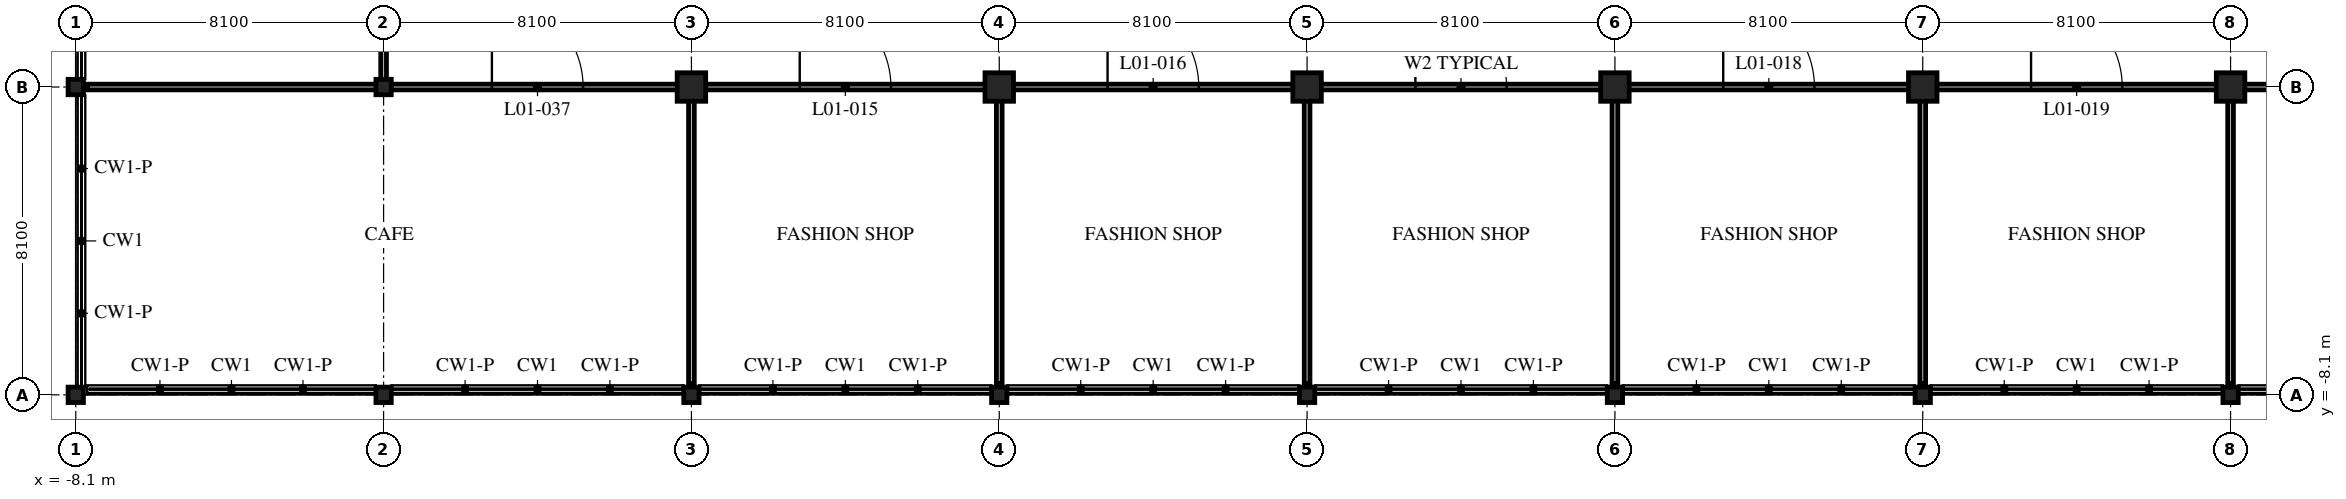
"""IFC4 building model, lengths in metres.
Left out: names, types, materials, properties, quantities, classifications, styles, units other than length and angle.
Written with IfcOpenShell. Run it as: python <this file> out.ifc"""

import sys

from ifc_helpers import new_model, si_unit, direction, frame, frame_2d, origin, origin_with_axes, origin_2d, place, context, subcontext, project, spatial, rectangle, hollow_rectangle, i_section, extrude, element, fill, save


model = new_model("IFC4")
c1 = context("Model", 3, precision=1e-05, world=origin(), true_north=direction((0.0, 1.0)))
c2 = subcontext(c1, "Body", "Model", "MODEL_VIEW")
j1 = project(units=[si_unit("LENGTHUNIT", "METRE"), si_unit("PLANEANGLEUNIT", "RADIAN")], contexts=[c1])
p1 = place(None, origin())
s1 = spatial("IfcSite", under=j1, at=p1, CompositionType="ELEMENT")
p2 = place(p1, origin())
s2 = spatial("IfcBuilding", under=s1, at=p2, CompositionType="ELEMENT")
p3 = place(p2, frame((0.0, 0.0, 6.0)))
s3 = spatial("IfcBuildingStorey", under=s2, at=p3, CompositionType="ELEMENT", Elevation=6.0)
for number, where, z_axis, x_axis in (
    (1, (-8.1, -8.1, 0.0), (0.0, 0.0, 1.0), (1.0, 0.0, 0.0)),
    (2, (-8.1, 0.0, 0.0), (0.0, 0.0, 1.0), (1.0, 0.0, 0.0)),
    (3, (0.0, -8.1, 0.0), (0.0, 0.0, 1.0), (1.0, 0.0, 0.0)),
    (4, (0.0, 0.0, 0.0), (0.0, 0.0, 1.0), (1.0, 0.0, 0.0)),
    (5, (8.1, -8.1, 0.0), (0.0, 0.0, 1.0), (1.0, 0.0, 0.0)),
):
    element("IfcColumn", number, at=place(p3, frame(where, z_axis=z_axis, x_axis=x_axis)), inside=s3, PredefinedType="COLUMN", context=c2, shape_type="SweptSolid", body=[
        extrude(i_section(OverallWidth=0.403, OverallDepth=0.406, WebThickness=0.027, FlangeThickness=0.043, FilletRadius=0.015, at=origin_2d()), origin(), (0.0, 0.0, 1.0), 5.4),
    ])
p4 = place(p3, frame((8.1, 0.0, 0.0), z_axis=(0.0, 0.0, 1.0), x_axis=(1.0, 0.0, 0.0)))
e6 = element("IfcColumn", 6, at=p4, inside=s3, PredefinedType="COLUMN", context=c2, shape_type="SweptSolid", body=[
    extrude(hollow_rectangle(XDim=0.75, YDim=0.75, WallThickness=0.07, at=origin_2d()), origin(), (0.0, 0.0, 1.0), 5.4),
])
p5 = place(p3, frame((16.2, -8.1, 0.0), z_axis=(0.0, 0.0, 1.0), x_axis=(1.0, 0.0, 0.0)))
e7 = element("IfcColumn", 7, at=p5, inside=s3, PredefinedType="COLUMN", context=c2, shape_type="SweptSolid", body=[
    extrude(i_section(OverallWidth=0.403, OverallDepth=0.406, WebThickness=0.027, FlangeThickness=0.043, FilletRadius=0.015, at=origin_2d()), origin(), (0.0, 0.0, 1.0), 5.4),
])
p6 = place(p3, frame((16.2, 0.0, 0.0), z_axis=(0.0, 0.0, 1.0), x_axis=(1.0, 0.0, 0.0)))
e8 = element("IfcColumn", 8, at=p6, inside=s3, PredefinedType="COLUMN", context=c2, shape_type="SweptSolid", body=[
    extrude(hollow_rectangle(XDim=0.75, YDim=0.75, WallThickness=0.07, at=origin_2d()), origin(), (0.0, 0.0, 1.0), 5.4),
])
p7 = place(p3, frame((24.3, -8.1, 0.0), z_axis=(0.0, 0.0, 1.0), x_axis=(1.0, 0.0, 0.0)))
e9 = element("IfcColumn", 9, at=p7, inside=s3, PredefinedType="COLUMN", context=c2, shape_type="SweptSolid", body=[
    extrude(i_section(OverallWidth=0.403, OverallDepth=0.406, WebThickness=0.027, FlangeThickness=0.043, FilletRadius=0.015, at=origin_2d()), origin(), (0.0, 0.0, 1.0), 5.4),
])
p8 = place(p3, frame((24.3, 0.0, 0.0), z_axis=(0.0, 0.0, 1.0), x_axis=(1.0, 0.0, 0.0)))
e10 = element("IfcColumn", 10, at=p8, inside=s3, PredefinedType="COLUMN", context=c2, shape_type="SweptSolid", body=[
    extrude(hollow_rectangle(XDim=0.75, YDim=0.75, WallThickness=0.07, at=origin_2d()), origin(), (0.0, 0.0, 1.0), 5.4),
])
p9 = place(p3, frame((32.4, -8.1, 0.0), z_axis=(0.0, 0.0, 1.0), x_axis=(1.0, 0.0, 0.0)))
e11 = element("IfcColumn", 11, at=p9, inside=s3, PredefinedType="COLUMN", context=c2, shape_type="SweptSolid", body=[
    extrude(i_section(OverallWidth=0.403, OverallDepth=0.406, WebThickness=0.027, FlangeThickness=0.043, FilletRadius=0.015, at=origin_2d()), origin(), (0.0, 0.0, 1.0), 5.4),
])
p10 = place(p3, frame((32.4, 0.0, 0.0), z_axis=(0.0, 0.0, 1.0), x_axis=(1.0, 0.0, 0.0)))
e12 = element("IfcColumn", 12, at=p10, inside=s3, PredefinedType="COLUMN", context=c2, shape_type="SweptSolid", body=[
    extrude(hollow_rectangle(XDim=0.75, YDim=0.75, WallThickness=0.07, at=origin_2d()), origin(), (0.0, 0.0, 1.0), 5.4),
])
p11 = place(p3, frame((40.5, -8.1, 0.0), z_axis=(0.0, 0.0, 1.0), x_axis=(1.0, 0.0, 0.0)))
e13 = element("IfcColumn", 13, at=p11, inside=s3, PredefinedType="COLUMN", context=c2, shape_type="SweptSolid", body=[
    extrude(i_section(OverallWidth=0.403, OverallDepth=0.406, WebThickness=0.027, FlangeThickness=0.043, FilletRadius=0.015, at=origin_2d()), origin(), (0.0, 0.0, 1.0), 5.4),
])
p12 = place(p3, frame((40.5, 0.0, 0.0), z_axis=(0.0, 0.0, 1.0), x_axis=(1.0, 0.0, 0.0)))
e14 = element("IfcColumn", 14, at=p12, inside=s3, PredefinedType="COLUMN", context=c2, shape_type="SweptSolid", body=[
    extrude(hollow_rectangle(XDim=0.75, YDim=0.75, WallThickness=0.07, at=origin_2d()), origin(), (0.0, 0.0, 1.0), 5.4),
])
p13 = place(p3, frame((48.6, -8.1, 0.0), z_axis=(0.0, 0.0, 1.0), x_axis=(1.0, 0.0, 0.0)))
e15 = element("IfcColumn", 15, at=p13, inside=s3, PredefinedType="COLUMN", context=c2, shape_type="SweptSolid", body=[
    extrude(i_section(OverallWidth=0.403, OverallDepth=0.406, WebThickness=0.027, FlangeThickness=0.043, FilletRadius=0.015, at=origin_2d()), origin(), (0.0, 0.0, 1.0), 5.4),
])
p14 = place(p3, frame((48.6, 0.0, 0.0), z_axis=(0.0, 0.0, 1.0), x_axis=(1.0, 0.0, 0.0)))
e16 = element("IfcColumn", 16, at=p14, inside=s3, PredefinedType="COLUMN", context=c2, shape_type="SweptSolid", body=[
    extrude(hollow_rectangle(XDim=0.75, YDim=0.75, WallThickness=0.07, at=origin_2d()), origin(), (0.0, 0.0, 1.0), 5.4),
])
p15 = place(p3, origin_with_axes())
e17 = element("IfcWall", 17, at=p15, inside=s3, PredefinedType="PARTITIONING", context=c2, shape_type="SweptSolid", body=[
    extrude(rectangle(XDim=56.7, YDim=0.15, at=frame_2d((28.35, 0.0))), origin(), (0.0, 0.0, 1.0), 4.538),
])
p16 = place(p15, frame((10.95, 0.0, 0.0)))
e18 = element("IfcOpeningElement", 18, at=p16, cuts=e17, PredefinedType="OPENING", context=c2, shape_type="SweptSolid", body=[
    extrude(rectangle(XDim=2.4, YDim=2.7, at=frame_2d((1.2, 1.35))), frame((0.0, 0.085, 0.0), z_axis=(0.0, -1.0, 0.0), x_axis=(1.0, 0.0, 0.0)), (0.0, 0.0, 1.0), 0.17),
])
p17 = place(p15, frame((19.05, 0.0, 0.0)))
e19 = element("IfcOpeningElement", 19, at=p17, cuts=e17, PredefinedType="OPENING", context=c2, shape_type="SweptSolid", body=[
    extrude(rectangle(XDim=2.4, YDim=2.7, at=frame_2d((1.2, 1.35))), frame((0.0, 0.085, 0.0), z_axis=(0.0, -1.0, 0.0), x_axis=(1.0, 0.0, 0.0)), (0.0, 0.0, 1.0), 0.17),
])
p18 = place(p15, frame((27.15, 0.0, 0.0)))
e20 = element("IfcOpeningElement", 20, at=p18, cuts=e17, PredefinedType="OPENING", context=c2, shape_type="SweptSolid", body=[
    extrude(rectangle(XDim=2.4, YDim=2.7, at=frame_2d((1.2, 1.35))), frame((0.0, 0.085, 0.0), z_axis=(0.0, -1.0, 0.0), x_axis=(1.0, 0.0, 0.0)), (0.0, 0.0, 1.0), 0.17),
])
p19 = place(p15, frame((35.25, 0.0, 0.0)))
e21 = element("IfcOpeningElement", 21, at=p19, cuts=e17, PredefinedType="OPENING", context=c2, shape_type="SweptSolid", body=[
    extrude(rectangle(XDim=2.4, YDim=2.7, at=frame_2d((1.2, 1.35))), frame((0.0, 0.085, 0.0), z_axis=(0.0, -1.0, 0.0), x_axis=(1.0, 0.0, 0.0)), (0.0, 0.0, 1.0), 0.17),
])
p20 = place(p15, frame((43.35, 0.0, 0.0)))
e22 = element("IfcOpeningElement", 22, at=p20, cuts=e17, PredefinedType="OPENING", context=c2, shape_type="SweptSolid", body=[
    extrude(rectangle(XDim=2.4, YDim=2.7, at=frame_2d((1.2, 1.35))), frame((0.0, 0.085, 0.0), z_axis=(0.0, -1.0, 0.0), x_axis=(1.0, 0.0, 0.0)), (0.0, 0.0, 1.0), 0.17),
])
p21 = place(p15, frame((2.85, 0.0, 0.0)))
e23 = element("IfcOpeningElement", 23, at=p21, cuts=e17, PredefinedType="OPENING", context=c2, shape_type="SweptSolid", body=[
    extrude(rectangle(XDim=2.4, YDim=2.7, at=frame_2d((1.2, 1.35))), frame((0.0, 0.085, 0.0), z_axis=(0.0, -1.0, 0.0), x_axis=(1.0, 0.0, 0.0)), (0.0, 0.0, 1.0), 0.17),
])
p22 = place(p15, frame((51.45, 0.0, 0.0)))
e24 = element("IfcOpeningElement", 24, at=p22, cuts=e17, PredefinedType="OPENING", context=c2, shape_type="SweptSolid", body=[
    extrude(rectangle(XDim=2.4, YDim=2.7, at=frame_2d((1.2, 1.35))), frame((0.0, 0.085, 0.0), z_axis=(0.0, -1.0, 0.0), x_axis=(1.0, 0.0, 0.0)), (0.0, 0.0, 1.0), 0.17),
])
p23 = place(p3, frame((0.0, 0.0, 0.0), z_axis=(0.0, 0.0, 1.0), x_axis=(0.0, 1.0, 0.0)))
e25 = element("IfcWall", 25, at=p23, inside=s3, PredefinedType="PARTITIONING", context=c2, shape_type="SweptSolid", body=[
    extrude(rectangle(XDim=44.1, YDim=0.15, at=frame_2d((22.05, 0.0))), origin(), (0.0, 0.0, 1.0), 4.538),
])
p24 = place(p23, frame((2.85, 0.0, 0.0)))
e26 = element("IfcOpeningElement", 26, at=p24, cuts=e25, PredefinedType="OPENING", context=c2, shape_type="SweptSolid", body=[
    extrude(rectangle(XDim=2.4, YDim=2.7, at=frame_2d((1.2, 1.35))), frame((0.0, 0.085, 0.0), z_axis=(0.0, -1.0, 0.0), x_axis=(1.0, 0.0, 0.0)), (0.0, 0.0, 1.0), 0.17),
])
p25 = place(p23, frame((10.95, 0.0, 0.0)))
e27 = element("IfcOpeningElement", 27, at=p25, cuts=e25, PredefinedType="OPENING", context=c2, shape_type="SweptSolid", body=[
    extrude(rectangle(XDim=2.4, YDim=2.7, at=frame_2d((1.2, 1.35))), frame((0.0, 0.085, 0.0), z_axis=(0.0, -1.0, 0.0), x_axis=(1.0, 0.0, 0.0)), (0.0, 0.0, 1.0), 0.17),
])
p26 = place(p23, frame((19.05, 0.0, 0.0)))
e28 = element("IfcOpeningElement", 28, at=p26, cuts=e25, PredefinedType="OPENING", context=c2, shape_type="SweptSolid", body=[
    extrude(rectangle(XDim=2.4, YDim=2.7, at=frame_2d((1.2, 1.35))), frame((0.0, 0.085, 0.0), z_axis=(0.0, -1.0, 0.0), x_axis=(1.0, 0.0, 0.0)), (0.0, 0.0, 1.0), 0.17),
])
p27 = place(p23, frame((27.15, 0.0, 0.0)))
e29 = element("IfcOpeningElement", 29, at=p27, cuts=e25, PredefinedType="OPENING", context=c2, shape_type="SweptSolid", body=[
    extrude(rectangle(XDim=2.4, YDim=2.7, at=frame_2d((1.2, 1.35))), frame((0.0, 0.085, 0.0), z_axis=(0.0, -1.0, 0.0), x_axis=(1.0, 0.0, 0.0)), (0.0, 0.0, 1.0), 0.17),
])
p28 = place(p23, frame((35.25, 0.0, 0.0)))
e30 = element("IfcOpeningElement", 30, at=p28, cuts=e25, PredefinedType="OPENING", context=c2, shape_type="SweptSolid", body=[
    extrude(rectangle(XDim=2.4, YDim=2.7, at=frame_2d((1.2, 1.35))), frame((0.0, 0.085, 0.0), z_axis=(0.0, -1.0, 0.0), x_axis=(1.0, 0.0, 0.0)), (0.0, 0.0, 1.0), 0.17),
])
p29 = place(p23, frame((41.325, 0.0, 0.0)))
e31 = element("IfcOpeningElement", 31, at=p29, cuts=e25, PredefinedType="OPENING", context=c2, shape_type="SweptSolid", body=[
    extrude(rectangle(XDim=2.4, YDim=2.7, at=frame_2d((1.2, 1.35))), frame((0.0, 0.085, 0.0), z_axis=(0.0, -1.0, 0.0), x_axis=(1.0, 0.0, 0.0)), (0.0, 0.0, 1.0), 0.17),
])
for number, where, z_axis, x_axis in (
    (32, (16.2, 0.0, 0.0), (0.0, 0.0, 1.0), (0.0, -1.0, 0.0)),
    (33, (24.3, 0.0, 0.0), (0.0, 0.0, 1.0), (0.0, -1.0, 0.0)),
    (34, (32.4, 0.0, 0.0), (0.0, 0.0, 1.0), (0.0, -1.0, 0.0)),
    (35, (40.5, 0.0, 0.0), (0.0, 0.0, 1.0), (0.0, -1.0, 0.0)),
    (36, (-7.8, 0.0, 0.0), (0.0, 0.0, 1.0), (1.0, 0.0, 0.0)),
    (37, (8.1, 0.0, 0.0), (0.0, 0.0, 1.0), (0.0, -1.0, 0.0)),
    (38, (48.6, 0.0, 0.0), (0.0, 0.0, 1.0), (0.0, -1.0, 0.0)),
):
    element("IfcWall", number, at=place(p3, frame(where, z_axis=z_axis, x_axis=x_axis)), inside=s3, PredefinedType="PARTITIONING", context=c2, shape_type="SweptSolid", body=[
        extrude(rectangle(XDim=7.8, YDim=0.15, at=frame_2d((3.9, 0.0))), origin(), (0.0, 0.0, 1.0), 4.538),
    ])
p30 = place(p16, origin())
e39 = element("IfcDoor", 39, at=p30, inside=s3, OperationType="DOUBLE_DOOR_SINGLE_SWING", PredefinedType="DOOR", context=c2, shape_type="SweptSolid", body=[
    extrude(rectangle(XDim=2.4, YDim=2.7, at=frame_2d((1.2, 1.35))), frame((0.0, 0.025, 0.0), z_axis=(0.0, -1.0, 0.0), x_axis=(1.0, 0.0, 0.0)), (0.0, 0.0, 1.0), 0.05),
])
fill(e18, e39)
p31 = place(p17, origin())
e40 = element("IfcDoor", 40, at=p31, inside=s3, OperationType="DOUBLE_DOOR_SINGLE_SWING", PredefinedType="DOOR", context=c2, shape_type="SweptSolid", body=[
    extrude(rectangle(XDim=2.4, YDim=2.7, at=frame_2d((1.2, 1.35))), frame((0.0, 0.025, 0.0), z_axis=(0.0, -1.0, 0.0), x_axis=(1.0, 0.0, 0.0)), (0.0, 0.0, 1.0), 0.05),
])
fill(e19, e40)
p32 = place(p18, origin())
e41 = element("IfcDoor", 41, at=p32, inside=s3, OperationType="DOUBLE_DOOR_SINGLE_SWING", PredefinedType="DOOR", context=c2, shape_type="SweptSolid", body=[
    extrude(rectangle(XDim=2.4, YDim=2.7, at=frame_2d((1.2, 1.35))), frame((0.0, 0.025, 0.0), z_axis=(0.0, -1.0, 0.0), x_axis=(1.0, 0.0, 0.0)), (0.0, 0.0, 1.0), 0.05),
])
fill(e20, e41)
p33 = place(p19, origin())
e42 = element("IfcDoor", 42, at=p33, inside=s3, OperationType="DOUBLE_DOOR_SINGLE_SWING", PredefinedType="DOOR", context=c2, shape_type="SweptSolid", body=[
    extrude(rectangle(XDim=2.4, YDim=2.7, at=frame_2d((1.2, 1.35))), frame((0.0, 0.025, 0.0), z_axis=(0.0, -1.0, 0.0), x_axis=(1.0, 0.0, 0.0)), (0.0, 0.0, 1.0), 0.05),
])
fill(e21, e42)
p34 = place(p20, origin())
e43 = element("IfcDoor", 43, at=p34, inside=s3, OperationType="DOUBLE_DOOR_SINGLE_SWING", PredefinedType="DOOR", context=c2, shape_type="SweptSolid", body=[
    extrude(rectangle(XDim=2.4, YDim=2.7, at=frame_2d((1.2, 1.35))), frame((0.0, 0.025, 0.0), z_axis=(0.0, -1.0, 0.0), x_axis=(1.0, 0.0, 0.0)), (0.0, 0.0, 1.0), 0.05),
])
fill(e22, e43)
p35 = place(p21, origin())
e44 = element("IfcDoor", 44, at=p35, inside=s3, OperationType="DOUBLE_DOOR_SINGLE_SWING", PredefinedType="DOOR", context=c2, shape_type="SweptSolid", body=[
    extrude(rectangle(XDim=2.4, YDim=2.7, at=frame_2d((1.2, 1.35))), frame((0.0, 0.025, 0.0), z_axis=(0.0, -1.0, 0.0), x_axis=(1.0, 0.0, 0.0)), (0.0, 0.0, 1.0), 0.05),
])
fill(e23, e44)
save(model, sys.argv[1])
